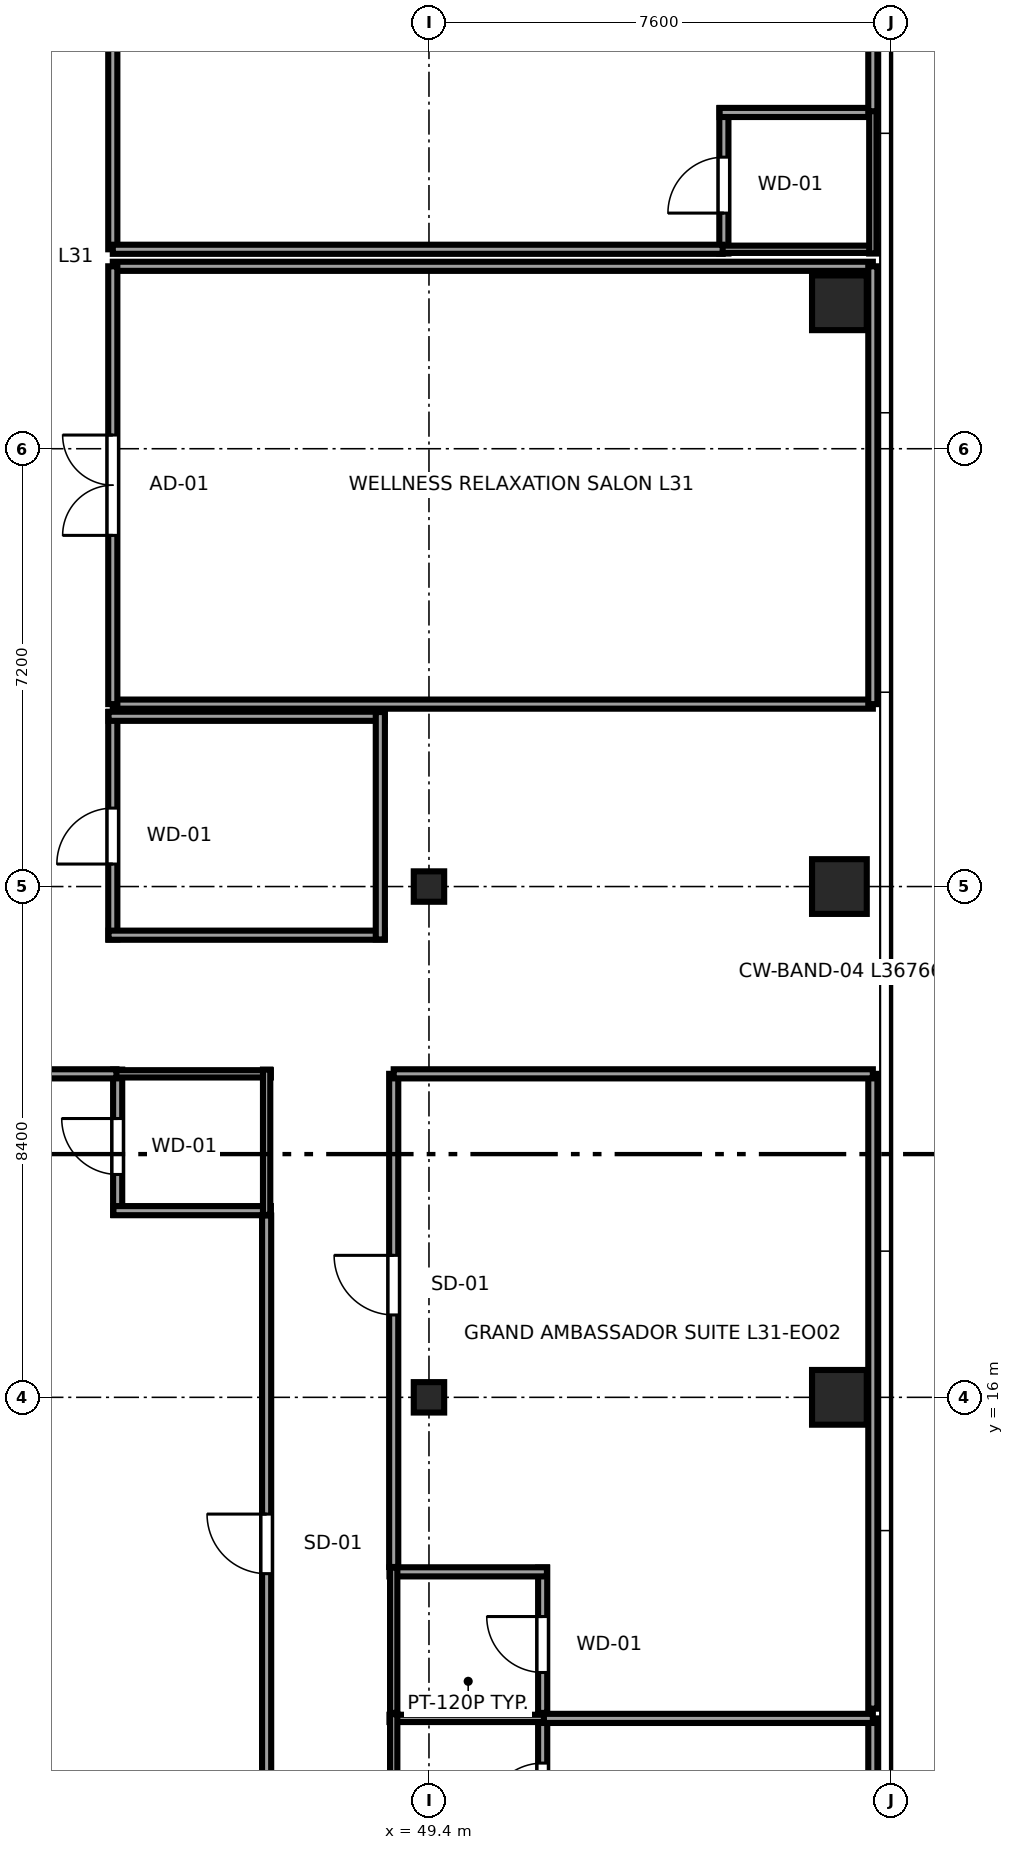
"""IFC4 building model, lengths in metres.
Left out: names, types, materials, properties, quantities, classifications, styles, units other than length and angle.
Written with IfcOpenShell. Run it as: python <this file> out.ifc"""

import sys

from ifc_helpers import new_model, si_unit, direction, frame, frame_2d, origin, origin_2d, place, context, subcontext, project, spatial, rectangle, i_section, extrude, source, transform, mapped, element, fill, save


model = new_model("IFC4")
c1 = context("Model", 3, precision=1e-05, world=origin(), true_north=direction((0.0, 1.0)))
c2 = subcontext(c1, "Body", "Model", "MODEL_VIEW")
j1 = project(units=[si_unit("LENGTHUNIT", "METRE"), si_unit("PLANEANGLEUNIT", "RADIAN")], contexts=[c1])
p1 = place(None, origin())
s1 = spatial("IfcSite", under=j1, at=p1, CompositionType="ELEMENT")
p2 = place(p1, origin())
s2 = spatial("IfcBuilding", under=s1, at=p2, CompositionType="ELEMENT")
p3 = place(p2, frame((0.0, 0.0, 122.2)))
s3 = spatial("IfcBuildingStorey", under=s2, at=p3, CompositionType="ELEMENT", Elevation=122.2)
m1 = source(origin(), c2, "Body", "SweptSolid", [
    extrude(i_section(OverallWidth=0.5, OverallDepth=0.5, WebThickness=0.022, FlangeThickness=0.034, at=origin_2d()), origin(), (0.0, 0.0, 1.0), 3.55),
])
for number, where, z_axis, x_axis in (
    (1, (49.4, 16.0, 0.0), (0.0, 0.0, 1.0), (1.0, 0.0, 0.0)),
    (2, (49.4, 24.4, 0.0), (0.0, 0.0, 1.0), (1.0, 0.0, 0.0)),
):
    element("IfcColumn", number, at=place(p3, frame(where, z_axis=z_axis, x_axis=x_axis)), inside=s3, PredefinedType="COLUMN", context=c2, shape_type="MappedRepresentation", body=[
        mapped(m1, transform((0.0, 0.0, 0.0), x_axis=(1.0, 0.0, 0.0), y_axis=(0.0, 1.0, 0.0), z_axis=(0.0, 0.0, 1.0), scale=1.0)),
    ])
m2 = source(origin(), c2, "Body", "SweptSolid", [
    extrude(rectangle(XDim=0.9, YDim=0.9, at=origin_2d()), origin(), (0.0, 0.0, 1.0), 3.55),
])
for number, where, z_axis, x_axis in (
    (3, (56.15, 16.0, 0.0), (0.0, 0.0, 1.0), (1.0, 0.0, 0.0)),
    (4, (56.15, 24.4, 0.0), (0.0, 0.0, 1.0), (1.0, 0.0, 0.0)),
    (5, (56.15, 34.0, 0.0), (0.0, 0.0, 1.0), (1.0, 0.0, 0.0)),
):
    element("IfcColumn", number, at=place(p3, frame(where, z_axis=z_axis, x_axis=x_axis)), inside=s3, PredefinedType="COLUMN", context=c2, shape_type="MappedRepresentation", body=[
        mapped(m2, transform((0.0, 0.0, 0.0), x_axis=(1.0, 0.0, 0.0), y_axis=(0.0, 1.0, 0.0), z_axis=(0.0, 0.0, 1.0), scale=1.0)),
    ])
p4 = place(p3, frame((44.28, 19.0, 0.0), z_axis=(0.0, 0.0, 1.0), x_axis=(0.0, 1.0, 0.0)))
e6 = element("IfcWall", 6, at=p4, inside=s3, PredefinedType="PARTITIONING", context=c2, shape_type="SweptSolid", body=[
    extrude(rectangle(XDim=2.39, YDim=0.15, at=frame_2d((1.195, 0.0))), origin(), (0.0, 0.0, 1.0), 3.37),
])
p5 = place(p4, frame((0.665, 0.0, 0.0)))
e7 = element("IfcOpeningElement", 7, at=p5, cuts=e6, PredefinedType="OPENING", context=c2, shape_type="SweptSolid", body=[
    extrude(rectangle(XDim=0.92, YDim=2.01, at=frame_2d((0.46, 1.005))), frame((0.0, 0.085, 0.0), z_axis=(0.0, -1.0, 0.0), x_axis=(1.0, 0.0, 0.0)), (0.0, 0.0, 1.0), 0.17),
])
p6 = place(p3, frame((44.21, 19.07, 0.0), z_axis=(0.0, 0.0, 1.0), x_axis=(1.0, 0.0, 0.0)))
e8 = element("IfcWall", 8, at=p6, inside=s3, PredefinedType="PARTITIONING", context=c2, shape_type="SweptSolid", body=[
    extrude(rectangle(XDim=2.59, YDim=0.15, at=frame_2d((1.295, 0.0))), origin(), (0.0, 0.0, 1.0), 3.37),
])
p7 = place(p3, frame((44.21, 21.32, 0.0), z_axis=(0.0, 0.0, 1.0), x_axis=(1.0, 0.0, 0.0)))
e9 = element("IfcWall", 9, at=p7, inside=s3, PredefinedType="PLUMBINGWALL", context=c2, shape_type="SweptSolid", body=[
    extrude(rectangle(XDim=2.59, YDim=0.12, at=frame_2d((1.295, 0.0))), origin(), (0.0, 0.0, 1.0), 3.37),
])
p8 = place(p3, frame((46.73, 19.0, 0.0), z_axis=(0.0, 0.0, 1.0), x_axis=(0.0, 1.0, 0.0)))
e10 = element("IfcWall", 10, at=p8, inside=s3, PredefinedType="PLUMBINGWALL", context=c2, shape_type="SweptSolid", body=[
    extrude(rectangle(XDim=2.39, YDim=0.12, at=frame_2d((1.195, 0.0))), origin(), (0.0, 0.0, 1.0), 3.37),
])
p9 = place(p3, frame((51.27, 8.4, 0.0), z_axis=(0.0, 0.0, 1.0), x_axis=(0.0, 1.0, 0.0)))
e11 = element("IfcWall", 11, at=p9, inside=s3, PredefinedType="PARTITIONING", context=c2, shape_type="SweptSolid", body=[
    extrude(rectangle(XDim=2.39, YDim=0.15, at=frame_2d((1.195, 0.0))), origin(), (0.0, 0.0, 1.0), 3.37),
])
p10 = place(p9, frame((0.665, 0.0, 0.0)))
e12 = element("IfcOpeningElement", 12, at=p10, cuts=e11, PredefinedType="OPENING", context=c2, shape_type="SweptSolid", body=[
    extrude(rectangle(XDim=0.92, YDim=2.01, at=frame_2d((0.46, 1.005))), frame((0.0, 0.085, 0.0), z_axis=(0.0, -1.0, 0.0), x_axis=(1.0, 0.0, 0.0)), (0.0, 0.0, 1.0), 0.17),
])
p11 = place(p3, frame((48.75, 10.72, 0.0), z_axis=(0.0, 0.0, 1.0), x_axis=(1.0, 0.0, 0.0)))
e13 = element("IfcWall", 13, at=p11, inside=s3, PredefinedType="PLUMBINGWALL", context=c2, shape_type="SweptSolid", body=[
    extrude(rectangle(XDim=2.59, YDim=0.12, at=frame_2d((1.295, 0.0))), origin(), (0.0, 0.0, 1.0), 3.37),
])
p12 = place(p3, frame((48.82, 8.4, 0.0), z_axis=(0.0, 0.0, 1.0), x_axis=(0.0, 1.0, 0.0)))
e14 = element("IfcWall", 14, at=p12, inside=s3, PredefinedType="PLUMBINGWALL", context=c2, shape_type="SweptSolid", body=[
    extrude(rectangle(XDim=2.39, YDim=0.12, at=frame_2d((1.195, 0.0))), origin(), (0.0, 0.0, 1.0), 3.37),
])
p13 = place(p3, frame((51.27, 10.81, 0.0), z_axis=(0.0, 0.0, 1.0), x_axis=(0.0, 1.0, 0.0)))
e15 = element("IfcWall", 15, at=p13, inside=s3, PredefinedType="PARTITIONING", context=c2, shape_type="SweptSolid", body=[
    extrude(rectangle(XDim=2.39, YDim=0.15, at=frame_2d((1.195, 0.0))), origin(), (0.0, 0.0, 1.0), 3.37),
])
p14 = place(p13, frame((0.665, 0.0, 0.0)))
e16 = element("IfcOpeningElement", 16, at=p14, cuts=e15, PredefinedType="OPENING", context=c2, shape_type="SweptSolid", body=[
    extrude(rectangle(XDim=0.92, YDim=2.01, at=frame_2d((0.46, 1.005))), frame((0.0, 0.085, 0.0), z_axis=(0.0, -1.0, 0.0), x_axis=(1.0, 0.0, 0.0)), (0.0, 0.0, 1.0), 0.17),
])
p15 = place(p3, frame((48.75, 13.13, 0.0), z_axis=(0.0, 0.0, 1.0), x_axis=(1.0, 0.0, 0.0)))
e17 = element("IfcWall", 17, at=p15, inside=s3, PredefinedType="PARTITIONING", context=c2, shape_type="SweptSolid", body=[
    extrude(rectangle(XDim=2.59, YDim=0.15, at=frame_2d((1.295, 0.0))), origin(), (0.0, 0.0, 1.0), 3.37),
])
p16 = place(p3, frame((48.82, 10.81, 0.0), z_axis=(0.0, 0.0, 1.0), x_axis=(0.0, 1.0, 0.0)))
e18 = element("IfcWall", 18, at=p16, inside=s3, PredefinedType="PLUMBINGWALL", context=c2, shape_type="SweptSolid", body=[
    extrude(rectangle(XDim=2.39, YDim=0.12, at=frame_2d((1.195, 0.0))), origin(), (0.0, 0.0, 1.0), 3.37),
])
p17 = place(p3, frame((54.25, 34.81, 0.0), z_axis=(0.0, 0.0, 1.0), x_axis=(0.0, 1.0, 0.0)))
e19 = element("IfcWall", 19, at=p17, inside=s3, PredefinedType="PARTITIONING", context=c2, shape_type="SweptSolid", body=[
    extrude(rectangle(XDim=2.39, YDim=0.15, at=frame_2d((1.195, 0.0))), origin(), (0.0, 0.0, 1.0), 3.37),
])
p18 = place(p17, frame((0.665, 0.0, 0.0)))
e20 = element("IfcOpeningElement", 20, at=p18, cuts=e19, PredefinedType="OPENING", context=c2, shape_type="SweptSolid", body=[
    extrude(rectangle(XDim=0.92, YDim=2.01, at=frame_2d((0.46, 1.005))), frame((0.0, 0.085, 0.0), z_axis=(0.0, -1.0, 0.0), x_axis=(1.0, 0.0, 0.0)), (0.0, 0.0, 1.0), 0.17),
])
p19 = place(p3, frame((54.18, 34.88, 0.0), z_axis=(0.0, 0.0, 1.0), x_axis=(1.0, 0.0, 0.0)))
e21 = element("IfcWall", 21, at=p19, inside=s3, PredefinedType="PLUMBINGWALL", context=c2, shape_type="SweptSolid", body=[
    extrude(rectangle(XDim=2.59, YDim=0.12, at=frame_2d((1.295, 0.0))), origin(), (0.0, 0.0, 1.0), 3.37),
])
p20 = place(p3, frame((54.18, 37.13, 0.0), z_axis=(0.0, 0.0, 1.0), x_axis=(1.0, 0.0, 0.0)))
e22 = element("IfcWall", 22, at=p20, inside=s3, PredefinedType="PARTITIONING", context=c2, shape_type="SweptSolid", body=[
    extrude(rectangle(XDim=2.59, YDim=0.15, at=frame_2d((1.295, 0.0))), origin(), (0.0, 0.0, 1.0), 3.37),
])
p21 = place(p3, frame((56.7, 34.81, 0.0), z_axis=(0.0, 0.0, 1.0), x_axis=(0.0, 1.0, 0.0)))
e23 = element("IfcWall", 23, at=p21, inside=s3, PredefinedType="PLUMBINGWALL", context=c2, shape_type="SweptSolid", body=[
    extrude(rectangle(XDim=2.39, YDim=0.12, at=frame_2d((1.195, 0.0))), origin(), (0.0, 0.0, 1.0), 3.37),
])
p22 = place(p3, frame((46.73, 8.23, 0.0), z_axis=(0.0, 0.0, 1.0), x_axis=(0.0, 1.0, 0.0)))
e24 = element("IfcWall", 24, at=p22, inside=s3, PredefinedType="PARTITIONING", context=c2, shape_type="SweptSolid", body=[
    extrude(rectangle(XDim=10.76, YDim=0.15, at=frame_2d((5.38, 0.0))), origin(), (0.0, 0.0, 1.0), 3.37),
])
p23 = place(p22, frame((4.87, 0.0, 0.0)))
e25 = element("IfcOpeningElement", 25, at=p23, cuts=e24, PredefinedType="OPENING", context=c2, shape_type="SweptSolid", body=[
    extrude(rectangle(XDim=0.98, YDim=2.12, at=frame_2d((0.49, 1.06))), frame((0.0, 0.085, 0.0), z_axis=(0.0, -1.0, 0.0), x_axis=(1.0, 0.0, 0.0)), (0.0, 0.0, 1.0), 0.17),
])
p24 = place(p3, frame((34.65, 21.32, 0.0), z_axis=(0.0, 0.0, 1.0), x_axis=(1.0, 0.0, 0.0)))
e26 = element("IfcWall", 26, at=p24, inside=s3, PredefinedType="PARTITIONING", context=c2, shape_type="SweptSolid", body=[
    extrude(rectangle(XDim=9.61, YDim=0.15, at=frame_2d((4.805, 0.0))), origin(), (0.0, 0.0, 1.0), 3.37),
])
p25 = place(p3, frame((56.7, 4.642, 0.0), z_axis=(0.0, 0.0, 1.0), x_axis=(0.0, 1.0, 0.0)))
e27 = element("IfcWall", 27, at=p25, inside=s3, PredefinedType="PARTITIONING", context=c2, shape_type="SweptSolid", body=[
    extrude(rectangle(XDim=6.078, YDim=0.15, at=frame_2d((3.039, 0.0))), origin(), (0.0, 0.0, 1.0), 3.37),
])
p26 = place(p3, frame((51.29, 10.72, 0.0), z_axis=(0.0, 0.0, 1.0), x_axis=(1.0, 0.0, 0.0)))
e28 = element("IfcWall", 28, at=p26, inside=s3, PredefinedType="PARTITIONING", context=c2, shape_type="SweptSolid", body=[
    extrude(rectangle(XDim=5.41, YDim=0.15, at=frame_2d((2.705, 0.0))), origin(), (0.0, 0.0, 1.0), 3.37),
])
p27 = place(p3, frame((48.82, 13.21, 0.0), z_axis=(0.0, 0.0, 1.0), x_axis=(0.0, 1.0, 0.0)))
e29 = element("IfcWall", 29, at=p27, inside=s3, PredefinedType="PARTITIONING", context=c2, shape_type="SweptSolid", body=[
    extrude(rectangle(XDim=8.11, YDim=0.15, at=frame_2d((4.055, 0.0))), origin(), (0.0, 0.0, 1.0), 3.37),
])
p28 = place(p27, frame((4.145, 0.0, 0.0)))
e30 = element("IfcOpeningElement", 30, at=p28, cuts=e29, PredefinedType="OPENING", context=c2, shape_type="SweptSolid", body=[
    extrude(rectangle(XDim=0.98, YDim=2.12, at=frame_2d((0.49, 1.06))), frame((0.0, 0.085, 0.0), z_axis=(0.0, -1.0, 0.0), x_axis=(1.0, 0.0, 0.0)), (0.0, 0.0, 1.0), 0.17),
])
p29 = place(p3, frame((56.7, 10.88, 0.0), z_axis=(0.0, 0.0, 1.0), x_axis=(0.0, 1.0, 0.0)))
e31 = element("IfcWall", 31, at=p29, inside=s3, PredefinedType="PARTITIONING", context=c2, shape_type="SweptSolid", body=[
    extrude(rectangle(XDim=10.44, YDim=0.15, at=frame_2d((5.22, 0.0))), origin(), (0.0, 0.0, 1.0), 3.37),
])
p30 = place(p3, frame((48.82, 21.32, 0.0), z_axis=(0.0, 0.0, 1.0), x_axis=(1.0, 0.0, 0.0)))
e32 = element("IfcWall", 32, at=p30, inside=s3, PredefinedType="PARTITIONING", context=c2, shape_type="SweptSolid", body=[
    extrude(rectangle(XDim=7.88, YDim=0.15, at=frame_2d((3.94, 0.0))), origin(), (0.0, 0.0, 1.0), 3.37),
])
p31 = place(p3, frame((44.2, 23.53, 0.0), z_axis=(0.0, 0.0, 1.0), x_axis=(0.0, 1.0, 0.0)))
e33 = element("IfcWall", 33, at=p31, inside=s3, PredefinedType="PARTITIONING", context=c2, shape_type="SweptSolid", body=[
    extrude(rectangle(XDim=3.74, YDim=0.15, at=frame_2d((1.87, 0.0))), origin(), (0.0, 0.0, 1.0), 3.37),
])
p32 = place(p31, frame((1.24, 0.0, 0.0)))
e34 = element("IfcOpeningElement", 34, at=p32, cuts=e33, PredefinedType="OPENING", context=c2, shape_type="SweptSolid", body=[
    extrude(rectangle(XDim=0.92, YDim=2.01, at=frame_2d((0.46, 1.005))), frame((0.0, 0.085, 0.0), z_axis=(0.0, -1.0, 0.0), x_axis=(1.0, 0.0, 0.0)), (0.0, 0.0, 1.0), 0.17),
])
for number, where, z_axis, x_axis in (
    (35, (44.13, 23.6, 0.0), (0.0, 0.0, 1.0), (1.0, 0.0, 0.0)),
    (36, (44.13, 27.2, 0.0), (0.0, 0.0, 1.0), (1.0, 0.0, 0.0)),
):
    element("IfcWall", number, at=place(p3, frame(where, z_axis=z_axis, x_axis=x_axis)), inside=s3, PredefinedType="PARTITIONING", context=c2, shape_type="SweptSolid", body=[
        extrude(rectangle(XDim=4.54, YDim=0.15, at=frame_2d((2.27, 0.0))), origin(), (0.0, 0.0, 1.0), 3.37),
    ])
p33 = place(p3, frame((48.6, 23.53, 0.0), z_axis=(0.0, 0.0, 1.0), x_axis=(0.0, 1.0, 0.0)))
e37 = element("IfcWall", 37, at=p33, inside=s3, PredefinedType="PARTITIONING", context=c2, shape_type="SweptSolid", body=[
    extrude(rectangle(XDim=3.74, YDim=0.15, at=frame_2d((1.87, 0.0))), origin(), (0.0, 0.0, 1.0), 3.37),
])
for number, where, z_axis, x_axis in (
    (38, (44.2, 27.4, 0.0), (0.0, 0.0, 1.0), (1.0, 0.0, 0.0)),
    (39, (44.2, 34.6, 0.0), (0.0, 0.0, 1.0), (1.0, 0.0, 0.0)),
):
    element("IfcWall", number, at=place(p3, frame(where, z_axis=z_axis, x_axis=x_axis)), inside=s3, PredefinedType="PARTITIONING", context=c2, shape_type="SweptSolid", body=[
        extrude(rectangle(XDim=12.5, YDim=0.15, at=frame_2d((6.25, 0.0))), origin(), (0.0, 0.0, 1.0), 3.37),
    ])
p34 = place(p3, frame((44.2, 27.4, 0.0), z_axis=(0.0, 0.0, 1.0), x_axis=(0.0, 1.0, 0.0)))
e40 = element("IfcWall", 40, at=p34, inside=s3, PredefinedType="PARTITIONING", context=c2, shape_type="SweptSolid", body=[
    extrude(rectangle(XDim=7.2, YDim=0.15, at=frame_2d((3.6, 0.0))), origin(), (0.0, 0.0, 1.0), 3.37),
])
p35 = place(p34, frame((2.775, 0.0, 0.0)))
e41 = element("IfcOpeningElement", 41, at=p35, cuts=e40, PredefinedType="OPENING", context=c2, shape_type="SweptSolid", body=[
    extrude(rectangle(XDim=1.65, YDim=2.15, at=frame_2d((0.825, 1.075))), frame((0.0, 0.085, 0.0), z_axis=(0.0, -1.0, 0.0), x_axis=(1.0, 0.0, 0.0)), (0.0, 0.0, 1.0), 0.17),
])
p36 = place(p3, frame((56.7, 27.4, 0.0), z_axis=(0.0, 0.0, 1.0), x_axis=(0.0, 1.0, 0.0)))
e42 = element("IfcWall", 42, at=p36, inside=s3, PredefinedType="PARTITIONING", context=c2, shape_type="SweptSolid", body=[
    extrude(rectangle(XDim=7.2, YDim=0.15, at=frame_2d((3.6, 0.0))), origin(), (0.0, 0.0, 1.0), 3.37),
])
p37 = place(p3, frame((44.2, 34.88, 0.0), z_axis=(0.0, 0.0, 1.0), x_axis=(0.0, 1.0, 0.0)))
e43 = element("IfcWall", 43, at=p37, inside=s3, PredefinedType="PARTITIONING", context=c2, shape_type="SweptSolid", body=[
    extrude(rectangle(XDim=9.33, YDim=0.15, at=frame_2d((4.665, 0.0))), origin(), (0.0, 0.0, 1.0), 3.37),
])
p38 = place(p37, frame((4.12, 0.0, 0.0)))
e44 = element("IfcOpeningElement", 44, at=p38, cuts=e43, PredefinedType="OPENING", context=c2, shape_type="SweptSolid", body=[
    extrude(rectangle(XDim=0.98, YDim=2.12, at=frame_2d((0.49, 1.06))), frame((0.0, 0.085, 0.0), z_axis=(0.0, -1.0, 0.0), x_axis=(1.0, 0.0, 0.0)), (0.0, 0.0, 1.0), 0.17),
])
p39 = place(p3, frame((44.2, 34.88, 0.0), z_axis=(0.0, 0.0, 1.0), x_axis=(1.0, 0.0, 0.0)))
e45 = element("IfcWall", 45, at=p39, inside=s3, PredefinedType="PARTITIONING", context=c2, shape_type="SweptSolid", body=[
    extrude(rectangle(XDim=10.03, YDim=0.15, at=frame_2d((5.015, 0.0))), origin(), (0.0, 0.0, 1.0), 3.37),
])
p40 = place(p3, frame((56.7, 37.15, 0.0), z_axis=(0.0, 0.0, 1.0), x_axis=(0.0, 1.0, 0.0)))
e46 = element("IfcWall", 46, at=p40, inside=s3, PredefinedType="PARTITIONING", context=c2, shape_type="SweptSolid", body=[
    extrude(rectangle(XDim=4.208, YDim=0.15, at=frame_2d((2.104, 0.0))), origin(), (0.0, 0.0, 1.0), 3.37),
])
m3 = source(origin(), c2, "Body", "SweptSolid", [
    extrude(rectangle(XDim=0.92, YDim=2.01, at=frame_2d((0.46, 1.005))), frame((0.0, 0.025, 0.0), z_axis=(0.0, -1.0, 0.0), x_axis=(1.0, 0.0, 0.0)), (0.0, 0.0, 1.0), 0.05),
])
p41 = place(p5, origin())
e47 = element("IfcDoor", 47, at=p41, inside=s3, OperationType="SINGLE_SWING_RIGHT", PredefinedType="DOOR", context=c2, shape_type="MappedRepresentation", body=[
    mapped(m3, transform((0.0, 0.0, 0.0), x_axis=(1.0, 0.0, 0.0), y_axis=(0.0, 1.0, 0.0), z_axis=(0.0, 0.0, 1.0), scale=1.0)),
])
fill(e7, e47)
p42 = place(p10, origin())
e48 = element("IfcDoor", 48, at=p42, inside=s3, OperationType="SINGLE_SWING_LEFT", PredefinedType="DOOR", context=c2, shape_type="MappedRepresentation", body=[
    mapped(m3, transform((0.0, 0.0, 0.0), x_axis=(1.0, 0.0, 0.0), y_axis=(0.0, 1.0, 0.0), z_axis=(0.0, 0.0, 1.0), scale=1.0)),
])
fill(e12, e48)
p43 = place(p14, origin())
e49 = element("IfcDoor", 49, at=p43, inside=s3, OperationType="SINGLE_SWING_RIGHT", PredefinedType="DOOR", context=c2, shape_type="MappedRepresentation", body=[
    mapped(m3, transform((0.0, 0.0, 0.0), x_axis=(1.0, 0.0, 0.0), y_axis=(0.0, 1.0, 0.0), z_axis=(0.0, 0.0, 1.0), scale=1.0)),
])
fill(e16, e49)
p44 = place(p18, origin())
e50 = element("IfcDoor", 50, at=p44, inside=s3, OperationType="SINGLE_SWING_LEFT", PredefinedType="DOOR", context=c2, shape_type="MappedRepresentation", body=[
    mapped(m3, transform((0.0, 0.0, 0.0), x_axis=(1.0, 0.0, 0.0), y_axis=(0.0, 1.0, 0.0), z_axis=(0.0, 0.0, 1.0), scale=1.0)),
])
fill(e20, e50)
m4 = source(origin(), c2, "Body", "SweptSolid", [
    extrude(rectangle(XDim=0.98, YDim=2.12, at=frame_2d((0.49, 1.06))), frame((0.0, 0.025, 0.0), z_axis=(0.0, -1.0, 0.0), x_axis=(1.0, 0.0, 0.0)), (0.0, 0.0, 1.0), 0.05),
])
p45 = place(p23, origin())
e51 = element("IfcDoor", 51, at=p45, inside=s3, OperationType="SINGLE_SWING_RIGHT", PredefinedType="DOOR", context=c2, shape_type="MappedRepresentation", body=[
    mapped(m4, transform((0.0, 0.0, 0.0), x_axis=(1.0, 0.0, 0.0), y_axis=(0.0, 1.0, 0.0), z_axis=(0.0, 0.0, 1.0), scale=1.0)),
])
fill(e25, e51)
p46 = place(p28, origin())
e52 = element("IfcDoor", 52, at=p46, inside=s3, OperationType="SINGLE_SWING_RIGHT", PredefinedType="DOOR", context=c2, shape_type="MappedRepresentation", body=[
    mapped(m4, transform((0.0, 0.0, 0.0), x_axis=(1.0, 0.0, 0.0), y_axis=(0.0, 1.0, 0.0), z_axis=(0.0, 0.0, 1.0), scale=1.0)),
])
fill(e30, e52)
p47 = place(p32, origin())
e53 = element("IfcDoor", 53, at=p47, inside=s3, OperationType="SINGLE_SWING_LEFT", PredefinedType="DOOR", context=c2, shape_type="MappedRepresentation", body=[
    mapped(m3, transform((0.0, 0.0, 0.0), x_axis=(1.0, 0.0, 0.0), y_axis=(0.0, 1.0, 0.0), z_axis=(0.0, 0.0, 1.0), scale=1.0)),
])
fill(e34, e53)
m5 = source(origin(), c2, "Body", "SweptSolid", [
    extrude(rectangle(XDim=1.65, YDim=2.15, at=frame_2d((0.825, 1.075))), frame((0.0, 0.025, 0.0), z_axis=(0.0, -1.0, 0.0), x_axis=(1.0, 0.0, 0.0)), (0.0, 0.0, 1.0), 0.05),
])
p48 = place(p35, origin())
e54 = element("IfcDoor", 54, at=p48, inside=s3, OperationType="DOUBLE_DOOR_SINGLE_SWING", PredefinedType="DOOR", context=c2, shape_type="MappedRepresentation", body=[
    mapped(m5, transform((0.0, 0.0, 0.0), x_axis=(1.0, 0.0, 0.0), y_axis=(0.0, 1.0, 0.0), z_axis=(0.0, 0.0, 1.0), scale=1.0)),
])
fill(e41, e54)
save(model, sys.argv[1])
